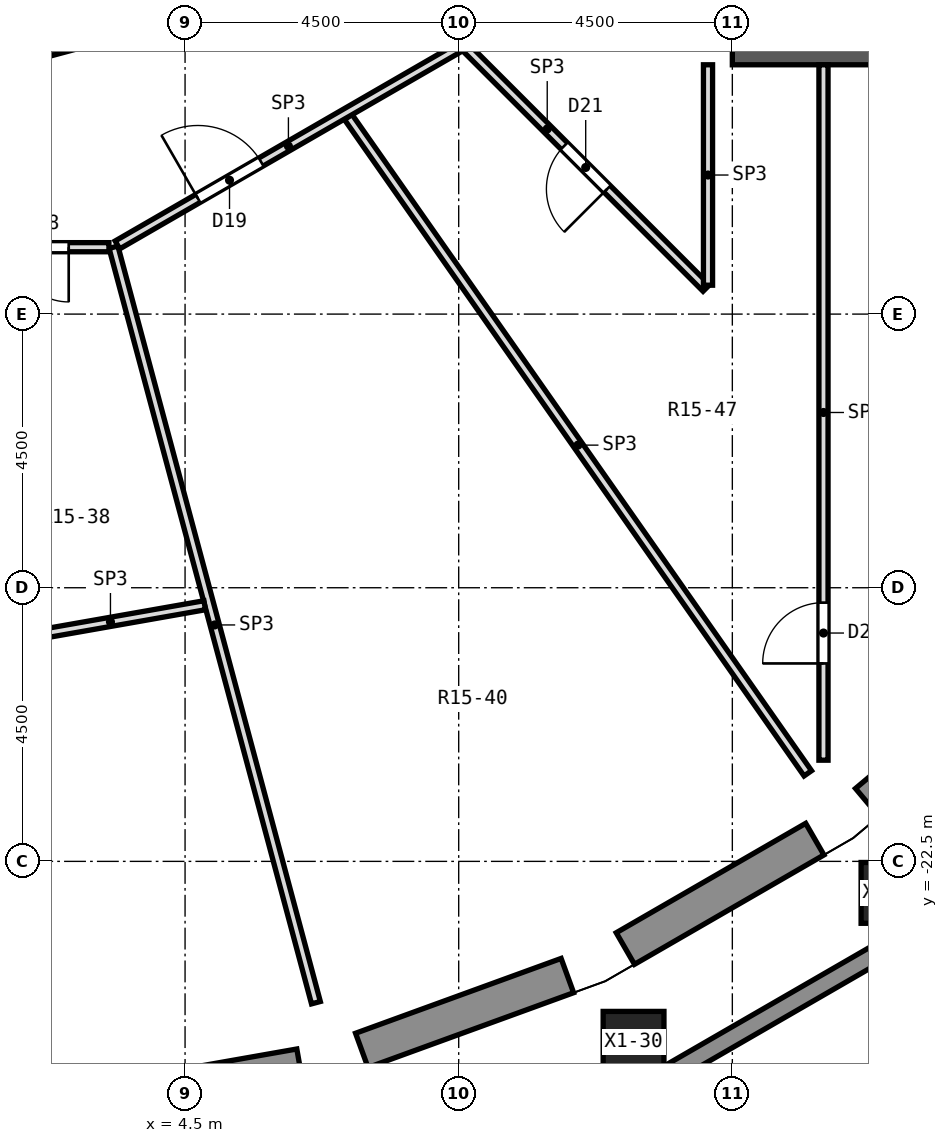
"""IFC4 building model, lengths in metres.
Left out: names, types, materials, properties, quantities, classifications, styles, units other than length and angle.
Written with IfcOpenShell. Run it as: python <this file> out.ifc"""

import sys

from ifc_helpers import new_model, si_unit, direction, frame, frame_2d, origin, origin_2d, place, context, subcontext, project, spatial, rectangle, hollow_rectangle, extrude, element, fill, save


model = new_model("IFC4")
c1 = context("Model", 3, precision=1e-05, world=origin(), true_north=direction((0.0, 1.0)))
c2 = subcontext(c1, "Body", "Model", "MODEL_VIEW")
j1 = project(units=[si_unit("LENGTHUNIT", "METRE"), si_unit("PLANEANGLEUNIT", "RADIAN")], contexts=[c1])
p1 = place(None, origin())
s1 = spatial("IfcSite", under=j1, at=p1, CompositionType="ELEMENT")
p2 = place(p1, origin())
s2 = spatial("IfcBuilding", under=s1, at=p2, CompositionType="ELEMENT")
p3 = place(p2, frame((0.0, 0.0, 82.4)))
s3 = spatial("IfcBuildingStorey", under=s2, at=p3, CompositionType="ELEMENT", Elevation=82.4)
for number, where, z_axis, x_axis in (
    (1, (2.449, -27.993, 0.251), (-0.044, 0.5, 0.865), (-0.996, -0.087, 0.0)),
    (2, (7.273, -27.143, 0.251), (-0.13, 0.485, 0.865), (-0.966, -0.259, 0.0)),
    (3, (11.875, -25.467, 0.251), (-0.212, 0.455, 0.865), (-0.906, -0.423, 0.0)),
):
    element("IfcColumn", number, at=place(p3, frame(where, z_axis=z_axis, x_axis=x_axis)), inside=s3, PredefinedType="COLUMN", context=c2, shape_type="SweptSolid", body=[
        extrude(hollow_rectangle(XDim=1.0, YDim=1.0, WallThickness=0.06, at=origin_2d()), origin(), (0.0, 0.0, 1.0), 3.986),
    ])
p4 = place(p3, frame((16.117, -23.018, 0.251), z_axis=(-0.287737885382, 0.410966626418, 0.86505106282), x_axis=(-0.819174562158, -0.573544276158, 0.0)))
e4 = element("IfcColumn", 4, at=p4, inside=s3, PredefinedType="COLUMN", context=c2, shape_type="SweptSolid", body=[
    extrude(hollow_rectangle(XDim=1.0, YDim=1.0, WallThickness=0.06, at=origin_2d()), origin(), (0.0, 0.0, 1.0), 3.986),
])
p5 = place(p3, frame((2.364, -8.821, 0.0), z_axis=(0.0, 0.0, 1.0), x_axis=(0.258819045103, -0.965925826289, 0.0)))
e5 = element("IfcColumn", 5, at=p5, inside=s3, PredefinedType="COLUMN", context=c2, shape_type="SweptSolid", body=[
    extrude(rectangle(XDim=0.8, YDim=0.8, at=origin_2d()), origin(), (0.0, 0.0, 1.0), 4.5),
])
p6 = place(p3, frame((13.5, -9.0, 0.0), z_axis=(0.0, 0.0, 1.0), x_axis=(1.0, 0.0, 0.0)))
e6 = element("IfcWall", 6, at=p6, inside=s3, PredefinedType="SHEAR", context=c2, shape_type="SweptSolid", body=[
    extrude(rectangle(XDim=10.4, YDim=0.8, at=frame_2d((5.2, 0.0))), origin(), (0.0, 0.0, 1.0), 4.5),
])
for number, where, z_axis, x_axis in (
    (7, (2.847, -26.506, 0.0), (0.0, 0.0, 1.0), (0.985, 0.174, 0.0)),
    (8, (7.406, -25.608, 0.0), (0.0, 0.0, 1.0), (0.94, 0.342, 0.0)),
    (9, (11.741, -23.933, 0.0), (0.0, 0.0, 1.0), (0.866, 0.5, 0.0)),
    (10, (15.719, -21.531, 0.0), (0.0, 0.0, 1.0), (0.766, 0.643, 0.0)),
):
    element("IfcWall", number, at=place(p3, frame(where, z_axis=z_axis, x_axis=x_axis)), inside=s3, PredefinedType="SOLIDWALL", context=c2, shape_type="SweptSolid", body=[
        extrude(rectangle(XDim=3.598, YDim=0.6, at=frame_2d((1.799, 0.0))), origin(), (0.0, 0.0, 1.0), 3.95),
    ])
p7 = place(p3, frame((12.181, -26.153, 0.0), z_axis=(0.0, 0.0, 1.0), x_axis=(0.866014270972, 0.500019282102, 0.0)))
e11 = element("IfcWall", 11, at=p7, inside=s3, PredefinedType="PARAPET", context=c2, shape_type="SweptSolid", body=[
    extrude(rectangle(XDim=5.055, YDim=0.3, at=frame_2d((2.527, 0.0))), origin(), (0.0, 0.0, 1.0), 1.1),
])
p8 = place(p3, frame((3.323, -12.4, 0.0), z_axis=(0.0, 0.0, 1.0), x_axis=(0.258824952043, -0.96592424351, 0.0)))
e12 = element("IfcWall", 12, at=p8, inside=s3, PredefinedType="PARTITIONING", context=c2, shape_type="SweptSolid", body=[
    extrude(rectangle(XDim=12.862, YDim=0.15, at=frame_2d((6.431, 0.0))), origin(), (0.0, 0.0, 1.0), 3.95),
])
p9 = place(p3, frame((7.182, -10.258, 0.0), z_axis=(0.0, 0.0, 1.0), x_axis=(0.573601596314, -0.819134426518, 0.0)))
e13 = element("IfcWall", 13, at=p9, inside=s3, PredefinedType="PARTITIONING", context=c2, shape_type="SweptSolid", body=[
    extrude(rectangle(XDim=13.178, YDim=0.15, at=frame_2d((6.589, 0.0))), origin(), (0.0, 0.0, 1.0), 3.95),
])
p10 = place(p3, frame((9.077, -9.077, 0.0), z_axis=(0.0, 0.0, 1.0), x_axis=(0.707106781187, -0.707106781187, 0.0)))
e14 = element("IfcWall", 14, at=p10, inside=s3, PredefinedType="PARTITIONING", context=c2, shape_type="SweptSolid", body=[
    extrude(rectangle(XDim=5.65, YDim=0.15, at=frame_2d((2.825, 0.0))), origin(), (0.0, 0.0, 1.0), 3.95),
])
p11 = place(p10, frame((2.345, 0.0, 0.0)))
e15 = element("IfcOpeningElement", 15, at=p11, cuts=e14, PredefinedType="OPENING", context=c2, shape_type="SweptSolid", body=[
    extrude(rectangle(XDim=1.0, YDim=2.1, at=frame_2d((0.5, 1.05))), frame((0.0, 0.087, 0.0), z_axis=(0.0, -1.0, 0.0), x_axis=(1.0, 0.0, 0.0)), (0.0, 0.0, 1.0), 0.174),
])
p12 = place(p3, frame((-3.248, -12.4, 0.0), z_axis=(0.0, 0.0, 1.0), x_axis=(1.0, 0.0, 0.0)))
e16 = element("IfcWall", 16, at=p12, inside=s3, PredefinedType="PARTITIONING", context=c2, shape_type="SweptSolid", body=[
    extrude(rectangle(XDim=6.496, YDim=0.15, at=frame_2d((3.248, 0.0))), origin(), (0.0, 0.0, 1.0), 3.95),
])
p13 = place(p12, frame((0.662, 0.0, 0.0)))
e17 = element("IfcOpeningElement", 17, at=p13, cuts=e16, PredefinedType="OPENING", context=c2, shape_type="SweptSolid", body=[
    extrude(rectangle(XDim=0.9, YDim=2.1, at=frame_2d((0.45, 1.05))), frame((0.0, 0.087, 0.0), z_axis=(0.0, -1.0, 0.0), x_axis=(1.0, 0.0, 0.0)), (0.0, 0.0, 1.0), 0.174),
])
p14 = place(p12, frame((2.648, 0.0, 0.0)))
e18 = element("IfcOpeningElement", 18, at=p14, cuts=e16, PredefinedType="OPENING", context=c2, shape_type="SweptSolid", body=[
    extrude(rectangle(XDim=1.2, YDim=2.1, at=frame_2d((0.6, 1.05))), frame((0.0, 0.087, 0.0), z_axis=(0.0, -1.0, 0.0), x_axis=(1.0, 0.0, 0.0)), (0.0, 0.0, 1.0), 0.174),
])
p15 = place(p12, frame((4.935, 0.0, 0.0)))
e19 = element("IfcOpeningElement", 19, at=p15, cuts=e16, PredefinedType="OPENING", context=c2, shape_type="SweptSolid", body=[
    extrude(rectangle(XDim=0.9, YDim=2.1, at=frame_2d((0.45, 1.05))), frame((0.0, 0.087, 0.0), z_axis=(0.0, -1.0, 0.0), x_axis=(1.0, 0.0, 0.0)), (0.0, 0.0, 1.0), 0.174),
])
p16 = place(p3, frame((1.723, -18.834, 0.0), z_axis=(0.0, 0.0, 1.0), x_axis=(0.984847517417, 0.173422511336, 0.0)))
e20 = element("IfcWall", 20, at=p16, inside=s3, PredefinedType="PARTITIONING", context=c2, shape_type="SweptSolid", body=[
    extrude(rectangle(XDim=3.148, YDim=0.15, at=frame_2d((1.574, 0.0))), origin(), (0.0, 0.0, 1.0), 3.95),
])
p17 = place(p3, frame((3.388, -12.363, 0.0), z_axis=(0.0, 0.0, 1.0), x_axis=(0.865967095912, 0.5001009786, 0.0)))
e21 = element("IfcWall", 21, at=p17, inside=s3, PredefinedType="PARTITIONING", context=c2, shape_type="SweptSolid", body=[
    extrude(rectangle(XDim=6.495, YDim=0.15, at=frame_2d((3.248, 0.0))), origin(), (0.0, 0.0, 1.0), 3.95),
])
p18 = place(p17, frame((1.528, 0.0, 0.0)))
e22 = element("IfcOpeningElement", 22, at=p18, cuts=e21, PredefinedType="OPENING", context=c2, shape_type="SweptSolid", body=[
    extrude(rectangle(XDim=1.2, YDim=2.1, at=frame_2d((0.6, 1.05))), frame((0.0, 0.087, 0.0), z_axis=(0.0, -1.0, 0.0), x_axis=(1.0, 0.0, 0.0)), (0.0, 0.0, 1.0), 0.174),
])
p19 = place(p3, frame((14.999, -20.836, 0.0), z_axis=(0.0, 0.0, 1.0), x_axis=(0.0, 1.0, 0.0)))
e23 = element("IfcWall", 23, at=p19, inside=s3, PredefinedType="PARTITIONING", context=c2, shape_type="SweptSolid", body=[
    extrude(rectangle(XDim=11.436, YDim=0.15, at=frame_2d((5.718, 0.0))), origin(), (0.0, 0.0, 1.0), 3.95),
])
p20 = place(p19, frame((1.591, 0.0, 0.0)))
e24 = element("IfcOpeningElement", 24, at=p20, cuts=e23, PredefinedType="OPENING", context=c2, shape_type="SweptSolid", body=[
    extrude(rectangle(XDim=1.0, YDim=2.1, at=frame_2d((0.5, 1.05))), frame((0.0, 0.087, 0.0), z_axis=(0.0, -1.0, 0.0), x_axis=(1.0, 0.0, 0.0)), (0.0, 0.0, 1.0), 0.174),
])
p21 = place(p3, frame((13.1, -13.025, 0.0), z_axis=(0.0, 0.0, 1.0), x_axis=(0.0, 1.0, 0.0)))
e25 = element("IfcWall", 25, at=p21, inside=s3, PredefinedType="PARTITIONING", context=c2, shape_type="SweptSolid", body=[
    extrude(rectangle(XDim=3.625, YDim=0.15, at=frame_2d((1.812, 0.0))), origin(), (0.0, 0.0, 1.0), 3.95),
])
p22 = place(p15, frame((0.9, 0.0, 0.0), z_axis=(0.0, 0.0, 1.0), x_axis=(-1.0, 0.0, 0.0)))
e26 = element("IfcDoor", 26, at=p22, inside=s3, OperationType="SINGLE_SWING_LEFT", PredefinedType="DOOR", context=c2, shape_type="SweptSolid", body=[
    extrude(rectangle(XDim=0.9, YDim=2.1, at=frame_2d((0.45, 1.05))), frame((0.0, 0.025, 0.0), z_axis=(0.0, -1.0, 0.0), x_axis=(1.0, 0.0, 0.0)), (0.0, 0.0, 1.0), 0.05),
])
fill(e19, e26)
p23 = place(p18, origin())
e27 = element("IfcDoor", 27, at=p23, inside=s3, OperationType="SINGLE_SWING_LEFT", PredefinedType="DOOR", context=c2, shape_type="SweptSolid", body=[
    extrude(rectangle(XDim=1.2, YDim=2.1, at=frame_2d((0.6, 1.05))), frame((0.0, 0.025, 0.0), z_axis=(0.0, -1.0, 0.0), x_axis=(1.0, 0.0, 0.0)), (0.0, 0.0, 1.0), 0.05),
])
fill(e22, e27)
p24 = place(p20, origin())
e28 = element("IfcDoor", 28, at=p24, inside=s3, OperationType="SINGLE_SWING_LEFT", PredefinedType="DOOR", context=c2, shape_type="SweptSolid", body=[
    extrude(rectangle(XDim=1.0, YDim=2.1, at=frame_2d((0.5, 1.05))), frame((0.0, 0.025, 0.0), z_axis=(0.0, -1.0, 0.0), x_axis=(1.0, 0.0, 0.0)), (0.0, 0.0, 1.0), 0.05),
])
fill(e24, e28)
p25 = place(p11, frame((1.0, 0.0, 0.0), z_axis=(0.0, 0.0, 1.0), x_axis=(-1.0, 0.0, 0.0)))
e29 = element("IfcDoor", 29, at=p25, inside=s3, OperationType="SINGLE_SWING_LEFT", PredefinedType="DOOR", context=c2, shape_type="SweptSolid", body=[
    extrude(rectangle(XDim=1.0, YDim=2.1, at=frame_2d((0.5, 1.05))), frame((0.0, 0.025, 0.0), z_axis=(0.0, -1.0, 0.0), x_axis=(1.0, 0.0, 0.0)), (0.0, 0.0, 1.0), 0.05),
])
fill(e15, e29)
save(model, sys.argv[1])
